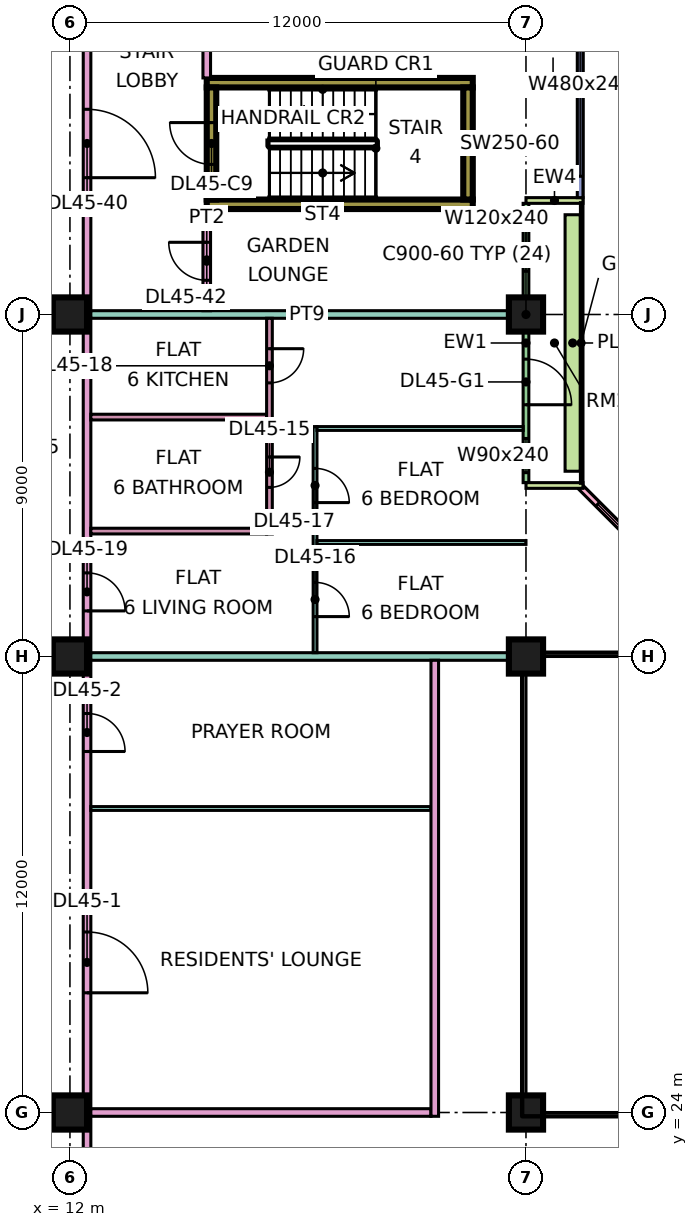
"""IFC4 building model, lengths in metres.
Left out: names, types, materials, properties, quantities, classifications, styles, units other than length and angle.
Written with IfcOpenShell. Run it as: python <this file> out.ifc"""

import sys

from ifc_helpers import new_model, si_unit, direction, frame, frame_2d, origin, origin_2d, place, context, subcontext, project, spatial, rectangle, extrude, element, fill, save


model = new_model("IFC4")
c1 = context("Model", 3, precision=1e-05, world=origin(), true_north=direction((0.0, 1.0)))
c2 = subcontext(c1, "Body", "Model", "MODEL_VIEW")
j1 = project(units=[si_unit("LENGTHUNIT", "METRE"), si_unit("PLANEANGLEUNIT", "RADIAN")], contexts=[c1])
p1 = place(None, origin())
s1 = spatial("IfcSite", under=j1, at=p1, CompositionType="ELEMENT")
p2 = place(p1, origin())
s2 = spatial("IfcBuilding", under=s1, at=p2, CompositionType="ELEMENT")
p3 = place(p2, frame((0.0, 0.0, 194.9)))
s3 = spatial("IfcBuildingStorey", under=s2, at=p3, CompositionType="ELEMENT", Elevation=194.9)
for number, where, z_axis, x_axis in (
    (1, (12.0, 24.0, 0.0), (0.0, 0.0, 1.0), (1.0, 0.0, 0.0)),
    (2, (12.0, 36.0, 0.0), (0.0, 0.0, 1.0), (1.0, 0.0, 0.0)),
    (3, (12.0, 45.0, 0.0), (0.0, 0.0, 1.0), (1.0, 0.0, 0.0)),
    (4, (24.0, 24.0, 0.0), (0.0, 0.0, 1.0), (1.0, 0.0, 0.0)),
    (5, (24.0, 36.0, 0.0), (0.0, 0.0, 1.0), (1.0, 0.0, 0.0)),
    (6, (24.0, 45.0, 0.0), (0.0, 0.0, 1.0), (1.0, 0.0, 0.0)),
):
    element("IfcColumn", number, at=place(p3, frame(where, z_axis=z_axis, x_axis=x_axis)), inside=s3, PredefinedType="COLUMN", context=c2, shape_type="SweptSolid", body=[
        extrude(rectangle(XDim=0.9, YDim=0.9, at=origin_2d()), origin(), (0.0, 0.0, 1.0), 3.75),
    ])
for number, where, z_axis, x_axis in (
    (7, (15.6, 47.9, 0.0), (0.0, 0.0, 1.0), (1.0, 0.0, 0.0)),
    (8, (15.6, 51.1, 0.0), (0.0, 0.0, 1.0), (1.0, 0.0, 0.0)),
):
    element("IfcWall", number, at=place(p3, frame(where, z_axis=z_axis, x_axis=x_axis)), inside=s3, PredefinedType="SHEAR", context=c2, shape_type="SweptSolid", body=[
        extrude(rectangle(XDim=7.0, YDim=0.25, at=frame_2d((3.5, 0.0))), origin(), (0.0, 0.0, 1.0), 3.75),
    ])
p4 = place(p3, frame((15.725, 48.025, 0.0), z_axis=(0.0, 0.0, 1.0), x_axis=(0.0, 1.0, 0.0)))
e9 = element("IfcWall", 9, at=p4, inside=s3, PredefinedType="SHEAR", context=c2, shape_type="SweptSolid", body=[
    extrude(rectangle(XDim=2.95, YDim=0.25, at=frame_2d((1.475, 0.0))), origin(), (0.0, 0.0, 1.0), 3.75),
])
p5 = place(p4, frame((0.925, 0.0, 0.0)))
e10 = element("IfcOpeningElement", 10, at=p5, cuts=e9, PredefinedType="OPENING", context=c2, shape_type="SweptSolid", body=[
    extrude(rectangle(XDim=1.1, YDim=2.2, at=frame_2d((0.55, 1.1))), frame((0.0, 0.135, 0.0), z_axis=(0.0, -1.0, 0.0), x_axis=(1.0, 0.0, 0.0)), (0.0, 0.0, 1.0), 0.27),
])
p6 = place(p3, frame((22.475, 48.025, 0.0), z_axis=(0.0, 0.0, 1.0), x_axis=(0.0, 1.0, 0.0)))
e11 = element("IfcWall", 11, at=p6, inside=s3, PredefinedType="SHEAR", context=c2, shape_type="SweptSolid", body=[
    extrude(rectangle(XDim=2.95, YDim=0.25, at=frame_2d((1.475, 0.0))), origin(), (0.0, 0.0, 1.0), 3.75),
])
p7 = place(p3, frame((28.447, 37.447, 0.0), z_axis=(0.0, 0.0, 1.0), x_axis=(-0.707106781187, 0.707106781187, 0.0)))
e12 = element("IfcWall", 12, at=p7, inside=s3, PredefinedType="SOLIDWALL", context=c2, shape_type="SweptSolid", body=[
    extrude(rectangle(XDim=4.243, YDim=0.15, at=frame_2d((2.121, 0.0))), origin(), (0.0, 0.0, 1.0), 3.35),
])
p8 = place(p7, frame((0.621, 0.0, 0.45)))
e13 = element("IfcOpeningElement", 13, at=p8, cuts=e12, PredefinedType="OPENING", context=c2, shape_type="SweptSolid", body=[
    extrude(rectangle(XDim=3.0, YDim=2.4, at=frame_2d((1.5, 1.2))), frame((0.0, 0.085, 0.0), z_axis=(0.0, -1.0, 0.0), x_axis=(1.0, 0.0, 0.0)), (0.0, 0.0, 1.0), 0.17),
])
p9 = place(p3, frame((24.0, 40.575, 0.0), z_axis=(0.0, 0.0, 1.0), x_axis=(0.0, 1.0, 0.0)))
e14 = element("IfcWall", 14, at=p9, inside=s3, PredefinedType="SOLIDWALL", context=c2, shape_type="SweptSolid", body=[
    extrude(rectangle(XDim=7.35, YDim=0.15, at=frame_2d((3.675, 0.0))), origin(), (0.0, 0.0, 1.0), 3.35),
])
p10 = place(p9, frame((0.262, 0.0, 0.45)))
e15 = element("IfcOpeningElement", 15, at=p10, cuts=e14, PredefinedType="OPENING", context=c2, shape_type="SweptSolid", body=[
    extrude(rectangle(XDim=0.9, YDim=2.4, at=frame_2d((0.45, 1.2))), frame((0.0, 0.085, 0.0), z_axis=(0.0, -1.0, 0.0), x_axis=(1.0, 0.0, 0.0)), (0.0, 0.0, 1.0), 0.17),
])
p11 = place(p9, frame((2.05, 0.0, 0.0)))
e16 = element("IfcOpeningElement", 16, at=p11, cuts=e14, PredefinedType="OPENING", context=c2, shape_type="SweptSolid", body=[
    extrude(rectangle(XDim=1.2, YDim=2.4, at=frame_2d((0.6, 1.2))), frame((0.0, 0.085, 0.0), z_axis=(0.0, -1.0, 0.0), x_axis=(1.0, 0.0, 0.0)), (0.0, 0.0, 1.0), 0.17),
])
p12 = place(p9, frame((5.562, 0.0, 0.45)))
e17 = element("IfcOpeningElement", 17, at=p12, cuts=e14, PredefinedType="OPENING", context=c2, shape_type="SweptSolid", body=[
    extrude(rectangle(XDim=1.2, YDim=2.4, at=frame_2d((0.6, 1.2))), frame((0.0, 0.085, 0.0), z_axis=(0.0, -1.0, 0.0), x_axis=(1.0, 0.0, 0.0)), (0.0, 0.0, 1.0), 0.17),
])
for number, where, z_axis, x_axis in (
    (18, (25.5, 40.5, 0.0), (0.0, 0.0, 1.0), (-1.0, 0.0, 0.0)),
    (19, (25.5, 48.0, 0.0), (0.0, 0.0, 1.0), (-1.0, 0.0, 0.0)),
):
    element("IfcWall", number, at=place(p3, frame(where, z_axis=z_axis, x_axis=x_axis)), inside=s3, PredefinedType="SOLIDWALL", context=c2, shape_type="SweptSolid", body=[
        extrude(rectangle(XDim=1.5, YDim=0.15, at=frame_2d((0.75, 0.0))), origin(), (0.0, 0.0, 1.0), 3.35),
    ])
p13 = place(p3, frame((25.425, 48.075, 0.0), z_axis=(0.0, 0.0, 1.0), x_axis=(0.0, 1.0, 0.0)))
e20 = element("IfcWall", 20, at=p13, inside=s3, PredefinedType="SOLIDWALL", context=c2, shape_type="SweptSolid", body=[
    extrude(rectangle(XDim=13.425, YDim=0.15, at=frame_2d((6.712, 0.0))), origin(), (0.0, 0.0, 1.0), 3.35),
])
p14 = place(p13, frame((0.562, 0.0, 0.45)))
e21 = element("IfcOpeningElement", 21, at=p14, cuts=e20, PredefinedType="OPENING", context=c2, shape_type="SweptSolid", body=[
    extrude(rectangle(XDim=4.8, YDim=2.4, at=frame_2d((2.4, 1.2))), frame((0.0, 0.085, 0.0), z_axis=(0.0, -1.0, 0.0), x_axis=(1.0, 0.0, 0.0)), (0.0, 0.0, 1.0), 0.17),
])
p15 = place(p13, frame((6.525, 0.0, 0.45)))
e22 = element("IfcOpeningElement", 22, at=p15, cuts=e20, PredefinedType="OPENING", context=c2, shape_type="SweptSolid", body=[
    extrude(rectangle(XDim=1.8, YDim=2.4, at=frame_2d((0.9, 1.2))), frame((0.0, 0.085, 0.0), z_axis=(0.0, -1.0, 0.0), x_axis=(1.0, 0.0, 0.0)), (0.0, 0.0, 1.0), 0.17),
])
p16 = place(p13, frame((9.525, 0.0, 0.45)))
e23 = element("IfcOpeningElement", 23, at=p16, cuts=e20, PredefinedType="OPENING", context=c2, shape_type="SweptSolid", body=[
    extrude(rectangle(XDim=1.8, YDim=2.4, at=frame_2d((0.9, 1.2))), frame((0.0, 0.085, 0.0), z_axis=(0.0, -1.0, 0.0), x_axis=(1.0, 0.0, 0.0)), (0.0, 0.0, 1.0), 0.17),
])
p17 = place(p13, frame((12.225, 0.0, 0.45)))
e24 = element("IfcOpeningElement", 24, at=p17, cuts=e20, PredefinedType="OPENING", context=c2, shape_type="SweptSolid", body=[
    extrude(rectangle(XDim=0.9, YDim=2.4, at=frame_2d((0.45, 1.2))), frame((0.0, 0.085, 0.0), z_axis=(0.0, -1.0, 0.0), x_axis=(1.0, 0.0, 0.0)), (0.0, 0.0, 1.0), 0.17),
])
p18 = place(p3, frame((25.229, 40.875, 0.0), z_axis=(0.0, 0.0, 1.0), x_axis=(0.0, 1.0, 0.0)))
e25 = element("IfcWall", 25, at=p18, inside=s3, PredefinedType="SOLIDWALL", context=c2, shape_type="SweptSolid", body=[
    extrude(rectangle(XDim=6.75, YDim=0.4, at=frame_2d((3.375, 0.0))), origin(), (0.0, 0.0, 1.0), 0.7),
])
p19 = place(p3, frame((12.45, 20.0, 0.0), z_axis=(0.0, 0.0, 1.0), x_axis=(0.0, 1.0, 0.0)))
e26 = element("IfcWall", 26, at=p19, inside=s3, PredefinedType="PARTITIONING", context=c2, shape_type="SweptSolid", body=[
    extrude(rectangle(XDim=42.926, YDim=0.2, at=frame_2d((21.463, 0.0))), origin(), (0.0, 0.0, 1.0), 3.35),
])
p20 = place(p19, frame((7.15, 0.0, 0.0)))
e27 = element("IfcOpeningElement", 27, at=p20, cuts=e26, PredefinedType="OPENING", context=c2, shape_type="SweptSolid", body=[
    extrude(rectangle(XDim=1.6, YDim=2.1, at=frame_2d((0.8, 1.05))), frame((0.0, 0.11, 0.0), z_axis=(0.0, -1.0, 0.0), x_axis=(1.0, 0.0, 0.0)), (0.0, 0.0, 1.0), 0.22),
])
p21 = place(p19, frame((13.5, 0.0, 0.0)))
e28 = element("IfcOpeningElement", 28, at=p21, cuts=e26, PredefinedType="OPENING", context=c2, shape_type="SweptSolid", body=[
    extrude(rectangle(XDim=1.0, YDim=2.1, at=frame_2d((0.5, 1.05))), frame((0.0, 0.11, 0.0), z_axis=(0.0, -1.0, 0.0), x_axis=(1.0, 0.0, 0.0)), (0.0, 0.0, 1.0), 0.22),
])
p22 = place(p19, frame((17.2, 0.0, 0.0)))
e29 = element("IfcOpeningElement", 29, at=p22, cuts=e26, PredefinedType="OPENING", context=c2, shape_type="SweptSolid", body=[
    extrude(rectangle(XDim=1.0, YDim=2.1, at=frame_2d((0.5, 1.05))), frame((0.0, 0.11, 0.0), z_axis=(0.0, -1.0, 0.0), x_axis=(1.0, 0.0, 0.0)), (0.0, 0.0, 1.0), 0.22),
])
p23 = place(p19, frame((35.2, 0.0, 0.0)))
e30 = element("IfcOpeningElement", 30, at=p23, cuts=e26, PredefinedType="OPENING", context=c2, shape_type="SweptSolid", body=[
    extrude(rectangle(XDim=1.0, YDim=2.1, at=frame_2d((0.5, 1.05))), frame((0.0, 0.11, 0.0), z_axis=(0.0, -1.0, 0.0), x_axis=(1.0, 0.0, 0.0)), (0.0, 0.0, 1.0), 0.22),
])
p24 = place(p19, frame((1.15, 0.0, 0.0)))
e31 = element("IfcOpeningElement", 31, at=p24, cuts=e26, PredefinedType="OPENING", context=c2, shape_type="SweptSolid", body=[
    extrude(rectangle(XDim=1.8, YDim=2.1, at=frame_2d((0.9, 1.05))), frame((0.0, 0.11, 0.0), z_axis=(0.0, -1.0, 0.0), x_axis=(1.0, 0.0, 0.0)), (0.0, 0.0, 1.0), 0.22),
])
p25 = place(p19, frame((28.6, 0.0, 0.0)))
e32 = element("IfcOpeningElement", 32, at=p25, cuts=e26, PredefinedType="OPENING", context=c2, shape_type="SweptSolid", body=[
    extrude(rectangle(XDim=1.8, YDim=2.1, at=frame_2d((0.9, 1.05))), frame((0.0, 0.11, 0.0), z_axis=(0.0, -1.0, 0.0), x_axis=(1.0, 0.0, 0.0)), (0.0, 0.0, 1.0), 0.22),
])
p26 = place(p3, frame((12.55, 24.0, 0.0), z_axis=(0.0, 0.0, 1.0), x_axis=(1.0, 0.0, 0.0)))
e33 = element("IfcWall", 33, at=p26, inside=s3, PredefinedType="PARTITIONING", context=c2, shape_type="SweptSolid", body=[
    extrude(rectangle(XDim=8.95, YDim=0.2, at=frame_2d((4.475, 0.0))), origin(), (0.0, 0.0, 1.0), 3.35),
])
p27 = place(p3, frame((12.55, 32.0, 0.0), z_axis=(0.0, 0.0, 1.0), x_axis=(1.0, 0.0, 0.0)))
e34 = element("IfcWall", 34, at=p27, inside=s3, PredefinedType="PARTITIONING", context=c2, shape_type="SweptSolid", body=[
    extrude(rectangle(XDim=8.95, YDim=0.1, at=frame_2d((4.475, 0.0))), origin(), (0.0, 0.0, 1.0), 3.35),
])
p28 = place(p3, frame((12.55, 36.0, 0.0), z_axis=(0.0, 0.0, 1.0), x_axis=(1.0, 0.0, 0.0)))
e35 = element("IfcWall", 35, at=p28, inside=s3, PredefinedType="PARTITIONING", context=c2, shape_type="SweptSolid", body=[
    extrude(rectangle(XDim=11.45, YDim=0.2, at=frame_2d((5.725, 0.0))), origin(), (0.0, 0.0, 1.0), 3.35),
])
for number, where, z_axis, x_axis in (
    (36, (12.55, 39.3, 0.0), (0.0, 0.0, 1.0), (1.0, 0.0, 0.0)),
    (37, (12.55, 42.3, 0.0), (0.0, 0.0, 1.0), (1.0, 0.0, 0.0)),
):
    element("IfcWall", number, at=place(p3, frame(where, z_axis=z_axis, x_axis=x_axis)), inside=s3, PredefinedType="PARTITIONING", context=c2, shape_type="SweptSolid", body=[
        extrude(rectangle(XDim=4.625, YDim=0.15, at=frame_2d((2.312, 0.0))), origin(), (0.0, 0.0, 1.0), 3.35),
    ])
p29 = place(p3, frame((12.55, 45.0, 0.0), z_axis=(0.0, 0.0, 1.0), x_axis=(1.0, 0.0, 0.0)))
e38 = element("IfcWall", 38, at=p29, inside=s3, PredefinedType="PARTITIONING", context=c2, shape_type="SweptSolid", body=[
    extrude(rectangle(XDim=11.376, YDim=0.2, at=frame_2d((5.688, 0.0))), origin(), (0.0, 0.0, 1.0), 3.35),
])
p30 = place(p3, frame((15.6, 45.1, 0.0), z_axis=(0.0, 0.0, 1.0), x_axis=(0.0, 1.0, 0.0)))
e39 = element("IfcWall", 39, at=p30, inside=s3, PredefinedType="PARTITIONING", context=c2, shape_type="SweptSolid", body=[
    extrude(rectangle(XDim=2.675, YDim=0.2, at=frame_2d((1.337, 0.0))), origin(), (0.0, 0.0, 1.0), 3.35),
])
p31 = place(p30, frame((0.8, 0.0, 0.0)))
e40 = element("IfcOpeningElement", 40, at=p31, cuts=e39, PredefinedType="OPENING", context=c2, shape_type="SweptSolid", body=[
    extrude(rectangle(XDim=1.0, YDim=2.1, at=frame_2d((0.5, 1.05))), frame((0.0, 0.11, 0.0), z_axis=(0.0, -1.0, 0.0), x_axis=(1.0, 0.0, 0.0)), (0.0, 0.0, 1.0), 0.22),
])
p32 = place(p3, frame((15.6, 51.225, 0.0), z_axis=(0.0, 0.0, 1.0), x_axis=(0.0, 1.0, 0.0)))
e41 = element("IfcWall", 41, at=p32, inside=s3, PredefinedType="PARTITIONING", context=c2, shape_type="SweptSolid", body=[
    extrude(rectangle(XDim=2.675, YDim=0.2, at=frame_2d((1.337, 0.0))), origin(), (0.0, 0.0, 1.0), 3.35),
])
p33 = place(p3, frame((17.25, 39.225, 0.0), z_axis=(0.0, 0.0, 1.0), x_axis=(0.0, 1.0, 0.0)))
e42 = element("IfcWall", 42, at=p33, inside=s3, PredefinedType="PARTITIONING", context=c2, shape_type="SweptSolid", body=[
    extrude(rectangle(XDim=5.675, YDim=0.15, at=frame_2d((2.837, 0.0))), origin(), (0.0, 0.0, 1.0), 3.35),
])
p34 = place(p33, frame((1.225, 0.0, 0.0)))
e43 = element("IfcOpeningElement", 43, at=p34, cuts=e42, PredefinedType="OPENING", context=c2, shape_type="SweptSolid", body=[
    extrude(rectangle(XDim=0.8, YDim=2.1, at=frame_2d((0.4, 1.05))), frame((0.0, 0.085, 0.0), z_axis=(0.0, -1.0, 0.0), x_axis=(1.0, 0.0, 0.0)), (0.0, 0.0, 1.0), 0.17),
])
p35 = place(p33, frame((3.975, 0.0, 0.0)))
e44 = element("IfcOpeningElement", 44, at=p35, cuts=e42, PredefinedType="OPENING", context=c2, shape_type="SweptSolid", body=[
    extrude(rectangle(XDim=0.9, YDim=2.1, at=frame_2d((0.45, 1.05))), frame((0.0, 0.085, 0.0), z_axis=(0.0, -1.0, 0.0), x_axis=(1.0, 0.0, 0.0)), (0.0, 0.0, 1.0), 0.17),
])
p36 = place(p3, frame((18.45, 36.1, 0.0), z_axis=(0.0, 0.0, 1.0), x_axis=(0.0, 1.0, 0.0)))
e45 = element("IfcWall", 45, at=p36, inside=s3, PredefinedType="PARTITIONING", context=c2, shape_type="SweptSolid", body=[
    extrude(rectangle(XDim=5.95, YDim=0.1, at=frame_2d((2.975, 0.0))), origin(), (0.0, 0.0, 1.0), 3.35),
])
p37 = place(p36, frame((0.95, 0.0, 0.0)))
e46 = element("IfcOpeningElement", 46, at=p37, cuts=e45, PredefinedType="OPENING", context=c2, shape_type="SweptSolid", body=[
    extrude(rectangle(XDim=0.9, YDim=2.1, at=frame_2d((0.45, 1.05))), frame((0.0, 0.06, 0.0), z_axis=(0.0, -1.0, 0.0), x_axis=(1.0, 0.0, 0.0)), (0.0, 0.0, 1.0), 0.12),
])
p38 = place(p36, frame((3.95, 0.0, 0.0)))
e47 = element("IfcOpeningElement", 47, at=p38, cuts=e45, PredefinedType="OPENING", context=c2, shape_type="SweptSolid", body=[
    extrude(rectangle(XDim=0.9, YDim=2.1, at=frame_2d((0.45, 1.05))), frame((0.0, 0.06, 0.0), z_axis=(0.0, -1.0, 0.0), x_axis=(1.0, 0.0, 0.0)), (0.0, 0.0, 1.0), 0.12),
])
p39 = place(p3, frame((18.5, 39.0, 0.0), z_axis=(0.0, 0.0, 1.0), x_axis=(1.0, 0.0, 0.0)))
e48 = element("IfcWall", 48, at=p39, inside=s3, PredefinedType="PARTITIONING", context=c2, shape_type="SweptSolid", body=[
    extrude(rectangle(XDim=5.5, YDim=0.1, at=frame_2d((2.75, 0.0))), origin(), (0.0, 0.0, 1.0), 3.35),
])
p40 = place(p3, frame((18.5, 42.0, 0.0), z_axis=(0.0, 0.0, 1.0), x_axis=(1.0, 0.0, 0.0)))
e49 = element("IfcWall", 49, at=p40, inside=s3, PredefinedType="PARTITIONING", context=c2, shape_type="SweptSolid", body=[
    extrude(rectangle(XDim=5.426, YDim=0.1, at=frame_2d((2.713, 0.0))), origin(), (0.0, 0.0, 1.0), 3.35),
])
p41 = place(p3, frame((21.6, 23.9, 0.0), z_axis=(0.0, 0.0, 1.0), x_axis=(0.0, 1.0, 0.0)))
e50 = element("IfcWall", 50, at=p41, inside=s3, PredefinedType="PARTITIONING", context=c2, shape_type="SweptSolid", body=[
    extrude(rectangle(XDim=12.0, YDim=0.2, at=frame_2d((6.0, 0.0))), origin(), (0.0, 0.0, 1.0), 3.35),
])
p42 = place(p8, origin())
e51 = element("IfcWindow", 51, at=p42, inside=s3, PartitioningType="SINGLE_PANEL", PredefinedType="WINDOW", context=c2, shape_type="SweptSolid", body=[
    extrude(rectangle(XDim=3.0, YDim=2.4, at=frame_2d((1.5, 1.2))), frame((0.0, 0.03, 0.0), z_axis=(0.0, -1.0, 0.0), x_axis=(1.0, 0.0, 0.0)), (0.0, 0.0, 1.0), 0.06),
])
fill(e13, e51)
p43 = place(p10, origin())
e52 = element("IfcWindow", 52, at=p43, inside=s3, PartitioningType="SINGLE_PANEL", PredefinedType="WINDOW", context=c2, shape_type="SweptSolid", body=[
    extrude(rectangle(XDim=0.9, YDim=2.4, at=frame_2d((0.45, 1.2))), frame((0.0, 0.03, 0.0), z_axis=(0.0, -1.0, 0.0), x_axis=(1.0, 0.0, 0.0)), (0.0, 0.0, 1.0), 0.06),
])
fill(e15, e52)
p44 = place(p11, frame((1.2, 0.0, 0.0), z_axis=(0.0, 0.0, 1.0), x_axis=(-1.0, 0.0, 0.0)))
e53 = element("IfcDoor", 53, at=p44, inside=s3, OperationType="DOUBLE_DOOR_SINGLE_SWING", PredefinedType="DOOR", context=c2, shape_type="SweptSolid", body=[
    extrude(rectangle(XDim=1.2, YDim=2.4, at=frame_2d((0.6, 1.2))), frame((0.0, 0.025, 0.0), z_axis=(0.0, -1.0, 0.0), x_axis=(1.0, 0.0, 0.0)), (0.0, 0.0, 1.0), 0.05),
])
fill(e16, e53)
p45 = place(p12, origin())
e54 = element("IfcWindow", 54, at=p45, inside=s3, PartitioningType="SINGLE_PANEL", PredefinedType="WINDOW", context=c2, shape_type="SweptSolid", body=[
    extrude(rectangle(XDim=1.2, YDim=2.4, at=frame_2d((0.6, 1.2))), frame((0.0, 0.03, 0.0), z_axis=(0.0, -1.0, 0.0), x_axis=(1.0, 0.0, 0.0)), (0.0, 0.0, 1.0), 0.06),
])
fill(e17, e54)
p46 = place(p14, origin())
e55 = element("IfcWindow", 55, at=p46, inside=s3, PartitioningType="SINGLE_PANEL", PredefinedType="WINDOW", context=c2, shape_type="SweptSolid", body=[
    extrude(rectangle(XDim=4.8, YDim=2.4, at=frame_2d((2.4, 1.2))), frame((0.0, 0.03, 0.0), z_axis=(0.0, -1.0, 0.0), x_axis=(1.0, 0.0, 0.0)), (0.0, 0.0, 1.0), 0.06),
])
fill(e21, e55)
p47 = place(p5, frame((1.1, 0.0, 0.0), z_axis=(0.0, 0.0, 1.0), x_axis=(-1.0, 0.0, 0.0)))
e56 = element("IfcDoor", 56, at=p47, inside=s3, OperationType="SINGLE_SWING_RIGHT", PredefinedType="DOOR", context=c2, shape_type="SweptSolid", body=[
    extrude(rectangle(XDim=1.1, YDim=2.2, at=frame_2d((0.55, 1.1))), frame((0.0, 0.025, 0.0), z_axis=(0.0, -1.0, 0.0), x_axis=(1.0, 0.0, 0.0)), (0.0, 0.0, 1.0), 0.05),
])
fill(e10, e56)
p48 = place(p20, frame((1.6, 0.0, 0.0), z_axis=(0.0, 0.0, 1.0), x_axis=(-1.0, 0.0, 0.0)))
e57 = element("IfcDoor", 57, at=p48, inside=s3, OperationType="DOUBLE_DOOR_SINGLE_SWING", PredefinedType="DOOR", context=c2, shape_type="SweptSolid", body=[
    extrude(rectangle(XDim=1.6, YDim=2.1, at=frame_2d((0.8, 1.05))), frame((0.0, 0.025, 0.0), z_axis=(0.0, -1.0, 0.0), x_axis=(1.0, 0.0, 0.0)), (0.0, 0.0, 1.0), 0.05),
])
fill(e27, e57)
p49 = place(p21, frame((1.0, 0.0, 0.0), z_axis=(0.0, 0.0, 1.0), x_axis=(-1.0, 0.0, 0.0)))
e58 = element("IfcDoor", 58, at=p49, inside=s3, OperationType="SINGLE_SWING_LEFT", PredefinedType="DOOR", context=c2, shape_type="SweptSolid", body=[
    extrude(rectangle(XDim=1.0, YDim=2.1, at=frame_2d((0.5, 1.05))), frame((0.0, 0.025, 0.0), z_axis=(0.0, -1.0, 0.0), x_axis=(1.0, 0.0, 0.0)), (0.0, 0.0, 1.0), 0.05),
])
fill(e28, e58)
p50 = place(p34, origin())
e59 = element("IfcDoor", 59, at=p50, inside=s3, OperationType="SINGLE_SWING_RIGHT", PredefinedType="DOOR", context=c2, shape_type="SweptSolid", body=[
    extrude(rectangle(XDim=0.8, YDim=2.1, at=frame_2d((0.4, 1.05))), frame((0.0, 0.025, 0.0), z_axis=(0.0, -1.0, 0.0), x_axis=(1.0, 0.0, 0.0)), (0.0, 0.0, 1.0), 0.05),
])
fill(e43, e59)
p51 = place(p37, frame((0.9, 0.0, 0.0), z_axis=(0.0, 0.0, 1.0), x_axis=(-1.0, 0.0, 0.0)))
e60 = element("IfcDoor", 60, at=p51, inside=s3, OperationType="SINGLE_SWING_LEFT", PredefinedType="DOOR", context=c2, shape_type="SweptSolid", body=[
    extrude(rectangle(XDim=0.9, YDim=2.1, at=frame_2d((0.45, 1.05))), frame((0.0, 0.025, 0.0), z_axis=(0.0, -1.0, 0.0), x_axis=(1.0, 0.0, 0.0)), (0.0, 0.0, 1.0), 0.05),
])
fill(e46, e60)
p52 = place(p38, frame((0.9, 0.0, 0.0), z_axis=(0.0, 0.0, 1.0), x_axis=(-1.0, 0.0, 0.0)))
e61 = element("IfcDoor", 61, at=p52, inside=s3, OperationType="SINGLE_SWING_LEFT", PredefinedType="DOOR", context=c2, shape_type="SweptSolid", body=[
    extrude(rectangle(XDim=0.9, YDim=2.1, at=frame_2d((0.45, 1.05))), frame((0.0, 0.025, 0.0), z_axis=(0.0, -1.0, 0.0), x_axis=(1.0, 0.0, 0.0)), (0.0, 0.0, 1.0), 0.05),
])
fill(e47, e61)
p53 = place(p35, origin())
e62 = element("IfcDoor", 62, at=p53, inside=s3, OperationType="SINGLE_SWING_RIGHT", PredefinedType="DOOR", context=c2, shape_type="SweptSolid", body=[
    extrude(rectangle(XDim=0.9, YDim=2.1, at=frame_2d((0.45, 1.05))), frame((0.0, 0.025, 0.0), z_axis=(0.0, -1.0, 0.0), x_axis=(1.0, 0.0, 0.0)), (0.0, 0.0, 1.0), 0.05),
])
fill(e44, e62)
p54 = place(p22, frame((1.0, 0.0, 0.0), z_axis=(0.0, 0.0, 1.0), x_axis=(-1.0, 0.0, 0.0)))
e63 = element("IfcDoor", 63, at=p54, inside=s3, OperationType="SINGLE_SWING_LEFT", PredefinedType="DOOR", context=c2, shape_type="SweptSolid", body=[
    extrude(rectangle(XDim=1.0, YDim=2.1, at=frame_2d((0.5, 1.05))), frame((0.0, 0.025, 0.0), z_axis=(0.0, -1.0, 0.0), x_axis=(1.0, 0.0, 0.0)), (0.0, 0.0, 1.0), 0.05),
])
fill(e29, e63)
p55 = place(p25, frame((1.8, 0.0, 0.0), z_axis=(0.0, 0.0, 1.0), x_axis=(-1.0, 0.0, 0.0)))
e64 = element("IfcDoor", 64, at=p55, inside=s3, OperationType="DOUBLE_DOOR_SINGLE_SWING", PredefinedType="DOOR", context=c2, shape_type="SweptSolid", body=[
    extrude(rectangle(XDim=1.8, YDim=2.1, at=frame_2d((0.9, 1.05))), frame((0.0, 0.025, 0.0), z_axis=(0.0, -1.0, 0.0), x_axis=(1.0, 0.0, 0.0)), (0.0, 0.0, 1.0), 0.05),
])
fill(e32, e64)
p56 = place(p31, frame((1.0, 0.0, 0.0), z_axis=(0.0, 0.0, 1.0), x_axis=(-1.0, 0.0, 0.0)))
e65 = element("IfcDoor", 65, at=p56, inside=s3, OperationType="SINGLE_SWING_RIGHT", PredefinedType="DOOR", context=c2, shape_type="SweptSolid", body=[
    extrude(rectangle(XDim=1.0, YDim=2.1, at=frame_2d((0.5, 1.05))), frame((0.0, 0.025, 0.0), z_axis=(0.0, -1.0, 0.0), x_axis=(1.0, 0.0, 0.0)), (0.0, 0.0, 1.0), 0.05),
])
fill(e40, e65)
save(model, sys.argv[1])
